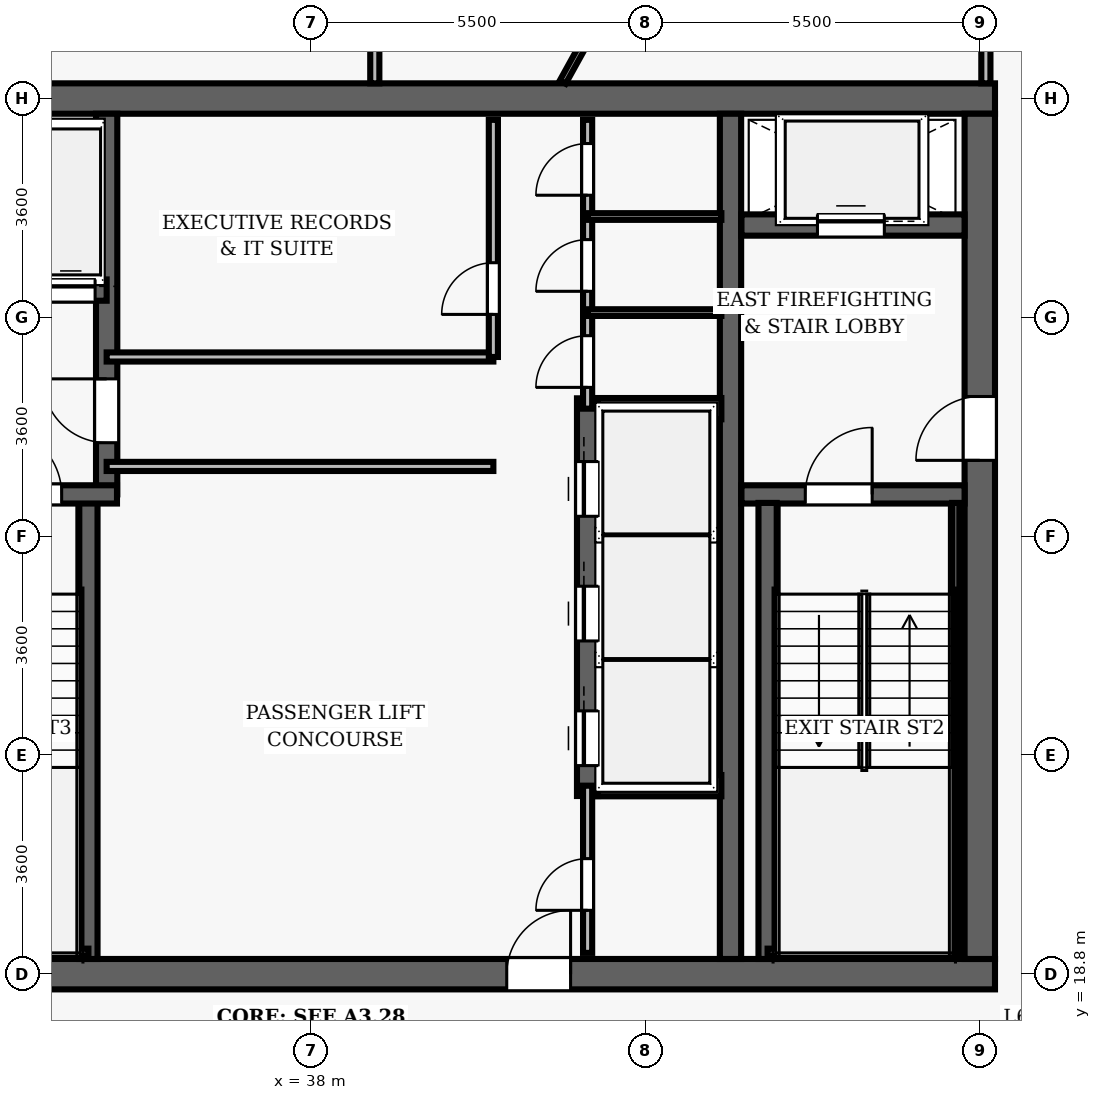
"""IFC4 building model, lengths in metres.
Left out: names, types, materials, properties, quantities, classifications, styles, units other than length and angle.
Written with IfcOpenShell. Run it as: python <this file> out.ifc"""

import sys

from ifc_helpers import new_model, si_unit, direction, frame, frame_2d, origin, place, context, subcontext, project, spatial, rectangle, extrude, element, fill, save


model = new_model("IFC4")
c1 = context("Model", 3, precision=1e-05, world=origin(), true_north=direction((0.0, 1.0)))
c2 = subcontext(c1, "Body", "Model", "MODEL_VIEW")
j1 = project(units=[si_unit("LENGTHUNIT", "METRE"), si_unit("PLANEANGLEUNIT", "RADIAN")], contexts=[c1])
p1 = place(None, origin())
s1 = spatial("IfcSite", under=j1, at=p1, CompositionType="ELEMENT")
p2 = place(p1, origin())
s2 = spatial("IfcBuilding", under=s1, at=p2, CompositionType="ELEMENT")
p3 = place(p2, frame((0.0, 0.0, 253.6)))
s3 = spatial("IfcBuildingStorey", under=s2, at=p3, CompositionType="ELEMENT", Elevation=253.6)
p4 = place(p3, frame((26.75, 18.8, 0.0), z_axis=(0.0, 0.0, 1.0), x_axis=(1.0, 0.0, 0.0)))
e1 = element("IfcWall", 1, at=p4, inside=s3, PredefinedType="SHEAR", context=c2, shape_type="SweptSolid", body=[
    extrude(rectangle(XDim=22.5, YDim=0.5, at=frame_2d((11.25, 0.0))), origin(), (0.0, 0.0, 1.0), 3.85),
])
p5 = place(p4, frame((14.47, 0.0, 0.0)))
e2 = element("IfcOpeningElement", 2, at=p5, cuts=e1, PredefinedType="OPENING", context=c2, shape_type="SweptSolid", body=[
    extrude(rectangle(XDim=1.05, YDim=2.15, at=frame_2d((0.525, 1.075))), frame((0.0, 0.26, 0.0), z_axis=(0.0, -1.0, 0.0), x_axis=(1.0, 0.0, 0.0)), (0.0, 0.0, 1.0), 0.52),
])
p6 = place(p3, frame((26.75, 33.2, 0.0), z_axis=(0.0, 0.0, 1.0), x_axis=(1.0, 0.0, 0.0)))
e3 = element("IfcWall", 3, at=p6, inside=s3, PredefinedType="SHEAR", context=c2, shape_type="SweptSolid", body=[
    extrude(rectangle(XDim=22.5, YDim=0.5, at=frame_2d((11.25, 0.0))), origin(), (0.0, 0.0, 1.0), 3.85),
])
p7 = place(p3, frame((49.0, 19.05, 0.0), z_axis=(0.0, 0.0, 1.0), x_axis=(0.0, 1.0, 0.0)))
e4 = element("IfcWall", 4, at=p7, inside=s3, PredefinedType="SHEAR", context=c2, shape_type="SweptSolid", body=[
    extrude(rectangle(XDim=13.9, YDim=0.5, at=frame_2d((6.95, 0.0))), origin(), (0.0, 0.0, 1.0), 3.85),
])
p8 = place(p7, frame((8.2, 0.0, 0.0)))
e5 = element("IfcOpeningElement", 5, at=p8, cuts=e4, PredefinedType="OPENING", context=c2, shape_type="SweptSolid", body=[
    extrude(rectangle(XDim=1.05, YDim=2.15, at=frame_2d((0.525, 1.075))), frame((0.0, 0.26, 0.0), z_axis=(0.0, -1.0, 0.0), x_axis=(1.0, 0.0, 0.0)), (0.0, 0.0, 1.0), 0.52),
])
p9 = place(p3, frame((44.9, 19.05, 0.0), z_axis=(0.0, 0.0, 1.0), x_axis=(0.0, 1.0, 0.0)))
e6 = element("IfcWall", 6, at=p9, inside=s3, PredefinedType="SHEAR", context=c2, shape_type="SweptSolid", body=[
    extrude(rectangle(XDim=13.9, YDim=0.35, at=frame_2d((6.95, 0.0))), origin(), (0.0, 0.0, 1.0), 3.85),
])
p10 = place(p3, frame((45.08, 26.69, 0.0), z_axis=(0.0, 0.0, 1.0), x_axis=(1.0, 0.0, 0.0)))
e7 = element("IfcWall", 7, at=p10, inside=s3, PredefinedType="SHEAR", context=c2, shape_type="SweptSolid", body=[
    extrude(rectangle(XDim=3.67, YDim=0.3, at=frame_2d((1.835, 0.0))), origin(), (0.0, 0.0, 1.0), 3.85),
])
p11 = place(p10, frame((1.05, 0.0, 0.0)))
e8 = element("IfcOpeningElement", 8, at=p11, cuts=e7, PredefinedType="OPENING", context=c2, shape_type="SweptSolid", body=[
    extrude(rectangle(XDim=1.1, YDim=2.15, at=frame_2d((0.55, 1.075))), frame((0.0, 0.16, 0.0), z_axis=(0.0, -1.0, 0.0), x_axis=(1.0, 0.0, 0.0)), (0.0, 0.0, 1.0), 0.32),
])
p12 = place(p3, frame((45.51, 19.05, 0.0), z_axis=(0.0, 0.0, 1.0), x_axis=(0.0, 1.0, 0.0)))
e9 = element("IfcWall", 9, at=p12, inside=s3, PredefinedType="SHEAR", context=c2, shape_type="SweptSolid", body=[
    extrude(rectangle(XDim=7.5, YDim=0.3, at=frame_2d((3.75, 0.0))), origin(), (0.0, 0.0, 1.0), 3.85),
])
p13 = place(p3, frame((48.605, 19.1, 0.0), z_axis=(0.0, 0.0, 1.0), x_axis=(0.0, 1.0, 0.0)))
e10 = element("IfcWall", 10, at=p13, inside=s3, PredefinedType="SHEAR", context=c2, shape_type="SweptSolid", body=[
    extrude(rectangle(XDim=7.45, YDim=0.12, at=frame_2d((3.725, 0.0))), origin(), (0.0, 0.0, 1.0), 3.85),
])
p14 = place(p3, frame((45.51, 19.16, 0.0), z_axis=(0.0, 0.0, 1.0), x_axis=(1.0, 0.0, 0.0)))
e11 = element("IfcWall", 11, at=p14, inside=s3, PredefinedType="SHEAR", context=c2, shape_type="SweptSolid", body=[
    extrude(rectangle(XDim=3.095, YDim=0.12, at=frame_2d((1.547, 0.0))), origin(), (0.0, 0.0, 1.0), 3.85),
])
p15 = place(p3, frame((45.08, 31.12, 0.0), z_axis=(0.0, 0.0, 1.0), x_axis=(1.0, 0.0, 0.0)))
e12 = element("IfcWall", 12, at=p15, inside=s3, PredefinedType="SHEAR", context=c2, shape_type="SweptSolid", body=[
    extrude(rectangle(XDim=3.67, YDim=0.35, at=frame_2d((1.835, 0.0))), origin(), (0.0, 0.0, 1.0), 3.04),
])
p16 = place(p15, frame((1.25, 0.0, 0.0)))
e13 = element("IfcOpeningElement", 13, at=p16, cuts=e12, PredefinedType="OPENING", context=c2, shape_type="SweptSolid", body=[
    extrude(rectangle(XDim=1.1, YDim=2.15, at=frame_2d((0.55, 1.075))), frame((0.0, 0.185, 0.0), z_axis=(0.0, -1.0, 0.0), x_axis=(1.0, 0.0, 0.0)), (0.0, 0.0, 1.0), 0.37),
])
p17 = place(p3, frame((34.34, 19.05, 0.0), z_axis=(0.0, 0.0, 1.0), x_axis=(0.0, 1.0, 0.0)))
e14 = element("IfcWall", 14, at=p17, inside=s3, PredefinedType="SHEAR", context=c2, shape_type="SweptSolid", body=[
    extrude(rectangle(XDim=7.5, YDim=0.3, at=frame_2d((3.75, 0.0))), origin(), (0.0, 0.0, 1.0), 3.85),
])
p18 = place(p3, frame((34.64, 26.69, 0.0), z_axis=(0.0, 0.0, 1.0), x_axis=(0.0, 1.0, 0.0)))
e15 = element("IfcWall", 15, at=p18, inside=s3, PredefinedType="SHEAR", context=c2, shape_type="SweptSolid", body=[
    extrude(rectangle(XDim=6.26, YDim=0.35, at=frame_2d((3.13, 0.0))), origin(), (0.0, 0.0, 1.0), 3.85),
])
p19 = place(p18, frame((0.85, 0.0, 0.0)))
e16 = element("IfcOpeningElement", 16, at=p19, cuts=e15, PredefinedType="OPENING", context=c2, shape_type="SweptSolid", body=[
    extrude(rectangle(XDim=1.05, YDim=2.15, at=frame_2d((0.525, 1.075))), frame((0.0, 0.185, 0.0), z_axis=(0.0, -1.0, 0.0), x_axis=(1.0, 0.0, 0.0)), (0.0, 0.0, 1.0), 0.37),
])
p20 = place(p3, frame((31.25, 26.69, 0.0), z_axis=(0.0, 0.0, 1.0), x_axis=(1.0, 0.0, 0.0)))
e17 = element("IfcWall", 17, at=p20, inside=s3, PredefinedType="SHEAR", context=c2, shape_type="SweptSolid", body=[
    extrude(rectangle(XDim=3.56, YDim=0.3, at=frame_2d((1.78, 0.0))), origin(), (0.0, 0.0, 1.0), 3.85),
])
p21 = place(p20, frame((1.55, 0.0, 0.0)))
e18 = element("IfcOpeningElement", 18, at=p21, cuts=e17, PredefinedType="OPENING", context=c2, shape_type="SweptSolid", body=[
    extrude(rectangle(XDim=1.1, YDim=2.15, at=frame_2d((0.55, 1.075))), frame((0.0, 0.16, 0.0), z_axis=(0.0, -1.0, 0.0), x_axis=(1.0, 0.0, 0.0)), (0.0, 0.0, 1.0), 0.32),
])
p22 = place(p3, frame((31.3, 19.16, 0.0), z_axis=(0.0, 0.0, 1.0), x_axis=(1.0, 0.0, 0.0)))
e19 = element("IfcWall", 19, at=p22, inside=s3, PredefinedType="SHEAR", context=c2, shape_type="SweptSolid", body=[
    extrude(rectangle(XDim=3.04, YDim=0.12, at=frame_2d((1.52, 0.0))), origin(), (0.0, 0.0, 1.0), 3.85),
])
p23 = place(p3, frame((32.23, 30.05, 0.0), z_axis=(0.0, 0.0, 1.0), x_axis=(1.0, 0.0, 0.0)))
e20 = element("IfcWall", 20, at=p23, inside=s3, PredefinedType="SHEAR", context=c2, shape_type="SweptSolid", body=[
    extrude(rectangle(XDim=2.41, YDim=0.35, at=frame_2d((1.205, 0.0))), origin(), (0.0, 0.0, 1.0), 3.04),
])
p24 = place(p23, frame((0.42, 0.0, 0.0)))
e21 = element("IfcOpeningElement", 21, at=p24, cuts=e20, PredefinedType="OPENING", context=c2, shape_type="SweptSolid", body=[
    extrude(rectangle(XDim=0.8, YDim=2.15, at=frame_2d((0.4, 1.075))), frame((0.0, 0.185, 0.0), z_axis=(0.0, -1.0, 0.0), x_axis=(1.0, 0.0, 0.0)), (0.0, 0.0, 1.0), 0.37),
])
p25 = place(p23, frame((1.42, 0.0, 0.0)))
e22 = element("IfcOpeningElement", 22, at=p25, cuts=e20, PredefinedType="OPENING", context=c2, shape_type="SweptSolid", body=[
    extrude(rectangle(XDim=0.8, YDim=2.15, at=frame_2d((0.4, 1.075))), frame((0.0, 0.185, 0.0), z_axis=(0.0, -1.0, 0.0), x_axis=(1.0, 0.0, 0.0)), (0.0, 0.0, 1.0), 0.37),
])
p26 = place(p3, frame((42.55, 21.73, 0.0), z_axis=(0.0, 0.0, 1.0), x_axis=(0.0, 1.0, 0.0)))
e23 = element("IfcWall", 23, at=p26, inside=s3, PredefinedType="SHEAR", context=c2, shape_type="SweptSolid", body=[
    extrude(rectangle(XDim=6.54, YDim=0.35, at=frame_2d((3.27, 0.0))), origin(), (0.0, 0.0, 1.0), 3.04),
])
p27 = place(p26, frame((0.5, 0.0, 0.0)))
e24 = element("IfcOpeningElement", 24, at=p27, cuts=e23, PredefinedType="OPENING", context=c2, shape_type="SweptSolid", body=[
    extrude(rectangle(XDim=0.9, YDim=2.15, at=frame_2d((0.45, 1.075))), frame((0.0, 0.185, 0.0), z_axis=(0.0, -1.0, 0.0), x_axis=(1.0, 0.0, 0.0)), (0.0, 0.0, 1.0), 0.37),
])
p28 = place(p26, frame((2.55, 0.0, 0.0)))
e25 = element("IfcOpeningElement", 25, at=p28, cuts=e23, PredefinedType="OPENING", context=c2, shape_type="SweptSolid", body=[
    extrude(rectangle(XDim=0.9, YDim=2.15, at=frame_2d((0.45, 1.075))), frame((0.0, 0.185, 0.0), z_axis=(0.0, -1.0, 0.0), x_axis=(1.0, 0.0, 0.0)), (0.0, 0.0, 1.0), 0.37),
])
p29 = place(p26, frame((4.6, 0.0, 0.0)))
e26 = element("IfcOpeningElement", 26, at=p29, cuts=e23, PredefinedType="OPENING", context=c2, shape_type="SweptSolid", body=[
    extrude(rectangle(XDim=0.9, YDim=2.15, at=frame_2d((0.45, 1.075))), frame((0.0, 0.185, 0.0), z_axis=(0.0, -1.0, 0.0), x_axis=(1.0, 0.0, 0.0)), (0.0, 0.0, 1.0), 0.37),
])
for number, where, z_axis, x_axis in (
    (27, (42.72, 21.9, 0.0), (0.0, 0.0, 1.0), (1.0, 0.0, 0.0)),
    (28, (42.72, 28.1, 0.0), (0.0, 0.0, 1.0), (1.0, 0.0, 0.0)),
):
    element("IfcWall", number, at=place(p3, frame(where, z_axis=z_axis, x_axis=x_axis)), inside=s3, PredefinedType="SHEAR", context=c2, shape_type="SweptSolid", body=[
        extrude(rectangle(XDim=2.03, YDim=0.35, at=frame_2d((1.015, 0.0))), origin(), (0.0, 0.0, 1.0), 3.04),
    ])
for number, where, z_axis, x_axis in (
    (29, (34.64, 27.15, 0.0), (0.0, 0.0, 1.0), (1.0, 0.0, 0.0)),
    (30, (34.64, 28.95, 0.0), (0.0, 0.0, 1.0), (1.0, 0.0, 0.0)),
):
    element("IfcWall", number, at=place(p3, frame(where, z_axis=z_axis, x_axis=x_axis)), inside=s3, PredefinedType="PARTITIONING", context=c2, shape_type="SweptSolid", body=[
        extrude(rectangle(XDim=6.36, YDim=0.15, at=frame_2d((3.18, 0.0))), origin(), (0.0, 0.0, 1.0), 3.04),
    ])
p30 = place(p3, frame((41.0, 28.95, 0.0), z_axis=(0.0, 0.0, 1.0), x_axis=(0.0, 1.0, 0.0)))
e31 = element("IfcWall", 31, at=p30, inside=s3, PredefinedType="PARTITIONING", context=c2, shape_type="SweptSolid", body=[
    extrude(rectangle(XDim=3.9, YDim=0.15, at=frame_2d((1.95, 0.0))), origin(), (0.0, 0.0, 1.0), 3.04),
])
p31 = place(p30, frame((0.7, 0.0, 0.0)))
e32 = element("IfcOpeningElement", 32, at=p31, cuts=e31, PredefinedType="OPENING", context=c2, shape_type="SweptSolid", body=[
    extrude(rectangle(XDim=0.85, YDim=2.1, at=frame_2d((0.425, 1.05))), frame((0.0, 0.085, 0.0), z_axis=(0.0, -1.0, 0.0), x_axis=(1.0, 0.0, 0.0)), (0.0, 0.0, 1.0), 0.17),
])
p32 = place(p3, frame((42.55, 28.1, 0.0), z_axis=(0.0, 0.0, 1.0), x_axis=(0.0, 1.0, 0.0)))
e33 = element("IfcWall", 33, at=p32, inside=s3, PredefinedType="PARTITIONING", context=c2, shape_type="SweptSolid", body=[
    extrude(rectangle(XDim=4.75, YDim=0.15, at=frame_2d((2.375, 0.0))), origin(), (0.0, 0.0, 1.0), 3.04),
])
p33 = place(p32, frame((0.35, 0.0, 0.0)))
e34 = element("IfcOpeningElement", 34, at=p33, cuts=e33, PredefinedType="OPENING", context=c2, shape_type="SweptSolid", body=[
    extrude(rectangle(XDim=0.85, YDim=2.1, at=frame_2d((0.425, 1.05))), frame((0.0, 0.085, 0.0), z_axis=(0.0, -1.0, 0.0), x_axis=(1.0, 0.0, 0.0)), (0.0, 0.0, 1.0), 0.17),
])
p34 = place(p32, frame((1.93, 0.0, 0.0)))
e35 = element("IfcOpeningElement", 35, at=p34, cuts=e33, PredefinedType="OPENING", context=c2, shape_type="SweptSolid", body=[
    extrude(rectangle(XDim=0.85, YDim=2.1, at=frame_2d((0.425, 1.05))), frame((0.0, 0.085, 0.0), z_axis=(0.0, -1.0, 0.0), x_axis=(1.0, 0.0, 0.0)), (0.0, 0.0, 1.0), 0.17),
])
p35 = place(p32, frame((3.51, 0.0, 0.0)))
e36 = element("IfcOpeningElement", 36, at=p35, cuts=e33, PredefinedType="OPENING", context=c2, shape_type="SweptSolid", body=[
    extrude(rectangle(XDim=0.85, YDim=2.1, at=frame_2d((0.425, 1.05))), frame((0.0, 0.085, 0.0), z_axis=(0.0, -1.0, 0.0), x_axis=(1.0, 0.0, 0.0)), (0.0, 0.0, 1.0), 0.17),
])
for number, where, z_axis, x_axis in (
    (37, (42.55, 29.68, 0.0), (0.0, 0.0, 1.0), (1.0, 0.0, 0.0)),
    (38, (42.55, 31.26, 0.0), (0.0, 0.0, 1.0), (1.0, 0.0, 0.0)),
):
    element("IfcWall", number, at=place(p3, frame(where, z_axis=z_axis, x_axis=x_axis)), inside=s3, PredefinedType="PARTITIONING", context=c2, shape_type="SweptSolid", body=[
        extrude(rectangle(XDim=2.2, YDim=0.11, at=frame_2d((1.1, 0.0))), origin(), (0.0, 0.0, 1.0), 3.04),
    ])
p36 = place(p3, frame((42.55, 19.15, 0.0), z_axis=(0.0, 0.0, 1.0), x_axis=(0.0, 1.0, 0.0)))
e39 = element("IfcWall", 39, at=p36, inside=s3, PredefinedType="PARTITIONING", context=c2, shape_type="SweptSolid", body=[
    extrude(rectangle(XDim=2.75, YDim=0.15, at=frame_2d((1.375, 0.0))), origin(), (0.0, 0.0, 1.0), 3.04),
])
p37 = place(p36, frame((0.7, 0.0, 0.0)))
e40 = element("IfcOpeningElement", 40, at=p37, cuts=e39, PredefinedType="OPENING", context=c2, shape_type="SweptSolid", body=[
    extrude(rectangle(XDim=0.85, YDim=2.1, at=frame_2d((0.425, 1.05))), frame((0.0, 0.085, 0.0), z_axis=(0.0, -1.0, 0.0), x_axis=(1.0, 0.0, 0.0)), (0.0, 0.0, 1.0), 0.17),
])
p38 = place(p3, frame((49.1, 33.45, 0.0), z_axis=(0.0, 0.0, 1.0), x_axis=(0.0, 1.0, 0.0)))
e41 = element("IfcWall", 41, at=p38, inside=s3, PredefinedType="PARTITIONING", context=c2, shape_type="SweptSolid", body=[
    extrude(rectangle(XDim=7.95, YDim=0.15, at=frame_2d((3.975, 0.0))), origin(), (0.0, 0.0, 1.0), 3.04),
])
p39 = place(p38, frame((2.308, 0.0, 0.0)))
e42 = element("IfcOpeningElement", 42, at=p39, cuts=e41, PredefinedType="OPENING", context=c2, shape_type="SweptSolid", body=[
    extrude(rectangle(XDim=0.95, YDim=2.15, at=frame_2d((0.475, 1.075))), frame((0.0, 0.085, 0.0), z_axis=(0.0, -1.0, 0.0), x_axis=(1.0, 0.0, 0.0)), (0.0, 0.0, 1.0), 0.17),
])
p40 = place(p3, frame((39.05, 33.45, 0.0), z_axis=(0.0, 0.0, 1.0), x_axis=(0.0, 1.0, 0.0)))
e43 = element("IfcWall", 43, at=p40, inside=s3, PredefinedType="PARTITIONING", context=c2, shape_type="SweptSolid", body=[
    extrude(rectangle(XDim=6.95, YDim=0.15, at=frame_2d((3.475, 0.0))), origin(), (0.0, 0.0, 1.0), 3.04),
])
p41 = place(p40, frame((1.262, 0.0, 0.0)))
e44 = element("IfcOpeningElement", 44, at=p41, cuts=e43, PredefinedType="OPENING", context=c2, shape_type="SweptSolid", body=[
    extrude(rectangle(XDim=0.95, YDim=2.15, at=frame_2d((0.475, 1.075))), frame((0.0, 0.085, 0.0), z_axis=(0.0, -1.0, 0.0), x_axis=(1.0, 0.0, 0.0)), (0.0, 0.0, 1.0), 0.17),
])
p42 = place(p3, frame((42.141, 33.47, 0.0), z_axis=(0.0, 0.0, 1.0), x_axis=(0.4848063211, 0.874621535878, 0.0)))
e45 = element("IfcWall", 45, at=p42, inside=s3, PredefinedType="PARTITIONING", context=c2, shape_type="SweptSolid", body=[
    extrude(rectangle(XDim=12.912, YDim=0.11, at=frame_2d((6.456, 0.0))), origin(), (0.0, 0.0, 1.0), 3.04),
])
p43 = place(p11, origin())
e46 = element("IfcDoor", 46, at=p43, inside=s3, OperationType="SINGLE_SWING_RIGHT", PredefinedType="DOOR", context=c2, shape_type="SweptSolid", body=[
    extrude(rectangle(XDim=1.1, YDim=2.15, at=frame_2d((0.55, 1.075))), frame((0.0, 0.025, 0.0), z_axis=(0.0, -1.0, 0.0), x_axis=(1.0, 0.0, 0.0)), (0.0, 0.0, 1.0), 0.05),
])
fill(e8, e46)
p44 = place(p8, origin())
e47 = element("IfcDoor", 47, at=p44, inside=s3, OperationType="SINGLE_SWING_LEFT", PredefinedType="DOOR", context=c2, shape_type="SweptSolid", body=[
    extrude(rectangle(XDim=1.05, YDim=2.15, at=frame_2d((0.525, 1.075))), frame((0.0, 0.025, 0.0), z_axis=(0.0, -1.0, 0.0), x_axis=(1.0, 0.0, 0.0)), (0.0, 0.0, 1.0), 0.05),
])
fill(e5, e47)
p45 = place(p21, origin())
e48 = element("IfcDoor", 48, at=p45, inside=s3, OperationType="SINGLE_SWING_LEFT", PredefinedType="DOOR", context=c2, shape_type="SweptSolid", body=[
    extrude(rectangle(XDim=1.1, YDim=2.15, at=frame_2d((0.55, 1.075))), frame((0.0, 0.025, 0.0), z_axis=(0.0, -1.0, 0.0), x_axis=(1.0, 0.0, 0.0)), (0.0, 0.0, 1.0), 0.05),
])
fill(e18, e48)
p46 = place(p5, origin())
e49 = element("IfcDoor", 49, at=p46, inside=s3, OperationType="SINGLE_SWING_RIGHT", PredefinedType="DOOR", context=c2, shape_type="SweptSolid", body=[
    extrude(rectangle(XDim=1.05, YDim=2.15, at=frame_2d((0.525, 1.075))), frame((0.0, 0.025, 0.0), z_axis=(0.0, -1.0, 0.0), x_axis=(1.0, 0.0, 0.0)), (0.0, 0.0, 1.0), 0.05),
])
fill(e2, e49)
p47 = place(p19, origin())
e50 = element("IfcDoor", 50, at=p47, inside=s3, OperationType="SINGLE_SWING_RIGHT", PredefinedType="DOOR", context=c2, shape_type="SweptSolid", body=[
    extrude(rectangle(XDim=1.05, YDim=2.15, at=frame_2d((0.525, 1.075))), frame((0.0, 0.025, 0.0), z_axis=(0.0, -1.0, 0.0), x_axis=(1.0, 0.0, 0.0)), (0.0, 0.0, 1.0), 0.05),
])
fill(e16, e50)
p48 = place(p31, origin())
e51 = element("IfcDoor", 51, at=p48, inside=s3, OperationType="SINGLE_SWING_LEFT", PredefinedType="DOOR", context=c2, shape_type="SweptSolid", body=[
    extrude(rectangle(XDim=0.85, YDim=2.1, at=frame_2d((0.425, 1.05))), frame((0.0, 0.025, 0.0), z_axis=(0.0, -1.0, 0.0), x_axis=(1.0, 0.0, 0.0)), (0.0, 0.0, 1.0), 0.05),
])
fill(e32, e51)
p49 = place(p33, origin())
e52 = element("IfcDoor", 52, at=p49, inside=s3, OperationType="SINGLE_SWING_LEFT", PredefinedType="DOOR", context=c2, shape_type="SweptSolid", body=[
    extrude(rectangle(XDim=0.85, YDim=2.1, at=frame_2d((0.425, 1.05))), frame((0.0, 0.025, 0.0), z_axis=(0.0, -1.0, 0.0), x_axis=(1.0, 0.0, 0.0)), (0.0, 0.0, 1.0), 0.05),
])
fill(e34, e52)
p50 = place(p34, origin())
e53 = element("IfcDoor", 53, at=p50, inside=s3, OperationType="SINGLE_SWING_LEFT", PredefinedType="DOOR", context=c2, shape_type="SweptSolid", body=[
    extrude(rectangle(XDim=0.85, YDim=2.1, at=frame_2d((0.425, 1.05))), frame((0.0, 0.025, 0.0), z_axis=(0.0, -1.0, 0.0), x_axis=(1.0, 0.0, 0.0)), (0.0, 0.0, 1.0), 0.05),
])
fill(e35, e53)
p51 = place(p35, origin())
e54 = element("IfcDoor", 54, at=p51, inside=s3, OperationType="SINGLE_SWING_LEFT", PredefinedType="DOOR", context=c2, shape_type="SweptSolid", body=[
    extrude(rectangle(XDim=0.85, YDim=2.1, at=frame_2d((0.425, 1.05))), frame((0.0, 0.025, 0.0), z_axis=(0.0, -1.0, 0.0), x_axis=(1.0, 0.0, 0.0)), (0.0, 0.0, 1.0), 0.05),
])
fill(e36, e54)
p52 = place(p37, origin())
e55 = element("IfcDoor", 55, at=p52, inside=s3, OperationType="SINGLE_SWING_LEFT", PredefinedType="DOOR", context=c2, shape_type="SweptSolid", body=[
    extrude(rectangle(XDim=0.85, YDim=2.1, at=frame_2d((0.425, 1.05))), frame((0.0, 0.025, 0.0), z_axis=(0.0, -1.0, 0.0), x_axis=(1.0, 0.0, 0.0)), (0.0, 0.0, 1.0), 0.05),
])
fill(e40, e55)
p53 = place(p27, origin())
e56 = element("IfcDoor", 56, at=p53, inside=s3, OperationType="SLIDING_TO_LEFT", PredefinedType="DOOR", context=c2, shape_type="SweptSolid", body=[
    extrude(rectangle(XDim=0.9, YDim=2.15, at=frame_2d((0.45, 1.075))), frame((0.0, 0.025, 0.0), z_axis=(0.0, -1.0, 0.0), x_axis=(1.0, 0.0, 0.0)), (0.0, 0.0, 1.0), 0.05),
])
fill(e24, e56)
p54 = place(p28, origin())
e57 = element("IfcDoor", 57, at=p54, inside=s3, OperationType="SLIDING_TO_LEFT", PredefinedType="DOOR", context=c2, shape_type="SweptSolid", body=[
    extrude(rectangle(XDim=0.9, YDim=2.15, at=frame_2d((0.45, 1.075))), frame((0.0, 0.025, 0.0), z_axis=(0.0, -1.0, 0.0), x_axis=(1.0, 0.0, 0.0)), (0.0, 0.0, 1.0), 0.05),
])
fill(e25, e57)
p55 = place(p29, origin())
e58 = element("IfcDoor", 58, at=p55, inside=s3, OperationType="SLIDING_TO_LEFT", PredefinedType="DOOR", context=c2, shape_type="SweptSolid", body=[
    extrude(rectangle(XDim=0.9, YDim=2.15, at=frame_2d((0.45, 1.075))), frame((0.0, 0.025, 0.0), z_axis=(0.0, -1.0, 0.0), x_axis=(1.0, 0.0, 0.0)), (0.0, 0.0, 1.0), 0.05),
])
fill(e26, e58)
p56 = place(p16, origin())
e59 = element("IfcDoor", 59, at=p56, inside=s3, OperationType="SLIDING_TO_LEFT", PredefinedType="DOOR", context=c2, shape_type="SweptSolid", body=[
    extrude(rectangle(XDim=1.1, YDim=2.15, at=frame_2d((0.55, 1.075))), frame((0.0, 0.025, 0.0), z_axis=(0.0, -1.0, 0.0), x_axis=(1.0, 0.0, 0.0)), (0.0, 0.0, 1.0), 0.05),
])
fill(e13, e59)
p57 = place(p25, origin())
e60 = element("IfcDoor", 60, at=p57, inside=s3, OperationType="SLIDING_TO_LEFT", PredefinedType="DOOR", context=c2, shape_type="SweptSolid", body=[
    extrude(rectangle(XDim=0.8, YDim=2.15, at=frame_2d((0.4, 1.075))), frame((0.0, 0.025, 0.0), z_axis=(0.0, -1.0, 0.0), x_axis=(1.0, 0.0, 0.0)), (0.0, 0.0, 1.0), 0.05),
])
fill(e22, e60)
save(model, sys.argv[1])
